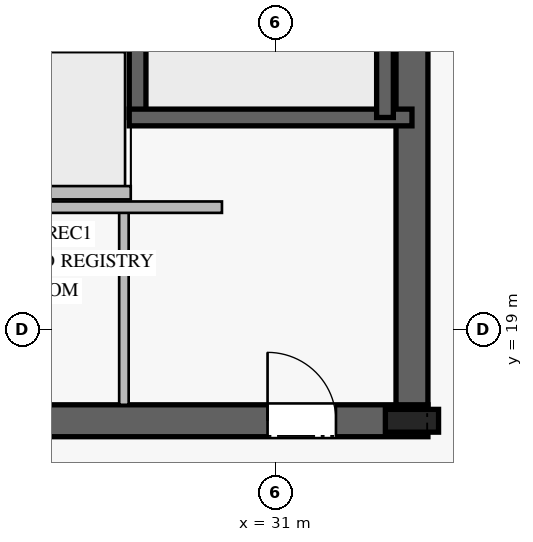
"""IFC4 building model, lengths in metres.
Left out: names, types, materials, properties, quantities, classifications, styles, units other than length and angle.
Written with IfcOpenShell. Run it as: python <this file> out.ifc"""

import sys

from ifc_helpers import new_model, si_unit, direction, frame, frame_2d, origin, origin_2d, place, context, subcontext, project, spatial, rectangle, i_section, extrude, element, fill, save


model = new_model("IFC4")
c1 = context("Model", 3, precision=1e-05, world=origin(), true_north=direction((0.0, 1.0)))
c2 = subcontext(c1, "Body", "Model", "MODEL_VIEW")
j1 = project(units=[si_unit("LENGTHUNIT", "METRE"), si_unit("PLANEANGLEUNIT", "RADIAN")], contexts=[c1])
p1 = place(None, origin())
s1 = spatial("IfcSite", under=j1, at=p1, CompositionType="ELEMENT")
p2 = place(p1, origin())
s2 = spatial("IfcBuilding", under=s1, at=p2, CompositionType="ELEMENT")
p3 = place(p2, frame((0.0, 0.0, 310.2)))
s3 = spatial("IfcBuildingStorey", under=s2, at=p3, CompositionType="ELEMENT", Elevation=310.2)
p4 = place(p3, frame((16.99, 17.8, 0.0), z_axis=(0.0, 0.0, 1.0), x_axis=(1.0, 0.0, 0.0)))
e1 = element("IfcWall", 1, at=p4, inside=s3, PredefinedType="SHEAR", context=c2, shape_type="SweptSolid", body=[
    extrude(rectangle(XDim=16.02, YDim=0.42, at=frame_2d((8.01, 0.0))), origin(), (0.0, 0.0, 1.0), 3.78),
])
p5 = place(p4, frame((4.96, 0.0, 0.0)))
e2 = element("IfcOpeningElement", 2, at=p5, cuts=e1, PredefinedType="OPENING", context=c2, shape_type="SweptSolid", body=[
    extrude(rectangle(XDim=1.2, YDim=2.25, at=frame_2d((0.6, 1.125))), frame((0.0, 0.22, 0.0), z_axis=(0.0, -1.0, 0.0), x_axis=(1.0, 0.0, 0.0)), (0.0, 0.0, 1.0), 0.44),
])
p6 = place(p4, frame((13.91, 0.0, 0.0)))
e3 = element("IfcOpeningElement", 3, at=p6, cuts=e1, PredefinedType="OPENING", context=c2, shape_type="SweptSolid", body=[
    extrude(rectangle(XDim=0.9, YDim=2.1, at=frame_2d((0.45, 1.05))), frame((0.0, 0.22, 0.0), z_axis=(0.0, -1.0, 0.0), x_axis=(1.0, 0.0, 0.0)), (0.0, 0.0, 1.0), 0.44),
])
p7 = place(p4, frame((9.16, 0.0, 0.0)))
e4 = element("IfcOpeningElement", 4, at=p7, cuts=e1, PredefinedType="OPENING", context=c2, shape_type="SweptSolid", body=[
    extrude(rectangle(XDim=1.1, YDim=2.2, at=frame_2d((0.55, 1.1))), frame((0.0, 0.22, 0.0), z_axis=(0.0, -1.0, 0.0), x_axis=(1.0, 0.0, 0.0)), (0.0, 0.0, 1.0), 0.44),
])
p8 = place(p3, frame((32.8, 18.01, 0.0), z_axis=(0.0, 0.0, 1.0), x_axis=(0.0, 1.0, 0.0)))
e5 = element("IfcWall", 5, at=p8, inside=s3, PredefinedType="SHEAR", context=c2, shape_type="SweptSolid", body=[
    extrude(rectangle(XDim=13.98, YDim=0.42, at=frame_2d((6.99, 0.0))), origin(), (0.0, 0.0, 1.0), 3.78),
])
p9 = place(p3, frame((32.8, 17.8, 0.0), z_axis=(0.0, 0.0, 1.0), x_axis=(1.0, 0.0, 0.0)))
e6 = element("IfcColumn", 6, at=p9, inside=s3, PredefinedType="COLUMN", context=c2, shape_type="SweptSolid", body=[
    extrude(i_section(OverallWidth=0.3, OverallDepth=0.7, WebThickness=0.017, FlangeThickness=0.032, at=origin_2d()), origin(), (0.0, 0.0, 1.0), 4.0),
])
p10 = place(p3, frame((29.19, 21.79, 0.0), z_axis=(0.0, 0.0, 1.0), x_axis=(0.0, 1.0, 0.0)))
e7 = element("IfcWall", 7, at=p10, inside=s3, PredefinedType="SOLIDWALL", context=c2, shape_type="SweptSolid", body=[
    extrude(rectangle(XDim=7.22, YDim=0.22, at=frame_2d((3.61, 0.0))), origin(), (0.0, 0.0, 1.0), 3.78),
])
p11 = place(p10, frame((5.88, 0.0, 0.0)))
e8 = element("IfcOpeningElement", 8, at=p11, cuts=e7, PredefinedType="OPENING", context=c2, shape_type="SweptSolid", body=[
    extrude(rectangle(XDim=1.15, YDim=2.2, at=frame_2d((0.575, 1.1))), frame((0.0, 0.12, 0.0), z_axis=(0.0, -1.0, 0.0), x_axis=(1.0, 0.0, 0.0)), (0.0, 0.0, 1.0), 0.24),
])
p12 = place(p3, frame((29.08, 21.79, 0.0), z_axis=(0.0, 0.0, 1.0), x_axis=(1.0, 0.0, 0.0)))
e9 = element("IfcWall", 9, at=p12, inside=s3, PredefinedType="SOLIDWALL", context=c2, shape_type="SweptSolid", body=[
    extrude(rectangle(XDim=3.72, YDim=0.22, at=frame_2d((1.86, 0.0))), origin(), (0.0, 0.0, 1.0), 3.78),
])
p13 = place(p3, frame((32.445, 29.01, 0.0), z_axis=(0.0, 0.0, 1.0), x_axis=(0.0, -1.0, 0.0)))
e10 = element("IfcWall", 10, at=p13, inside=s3, PredefinedType="SOLIDWALL", context=c2, shape_type="SweptSolid", body=[
    extrude(rectangle(XDim=7.22, YDim=0.22, at=frame_2d((3.61, 0.0))), origin(), (0.0, 0.0, 1.0), 3.78),
])
p14 = place(p3, frame((29.01, 18.01, 0.0), z_axis=(0.0, 0.0, 1.0), x_axis=(0.0, 1.0, 0.0)))
e11 = element("IfcWall", 11, at=p14, inside=s3, PredefinedType="PARTITIONING", context=c2, shape_type="SweptSolid", body=[
    extrude(rectangle(XDim=2.54, YDim=0.125, at=frame_2d((1.27, 0.0))), origin(), (0.0, 0.0, 1.0), 3.78),
])
p15 = place(p3, frame((24.4, 20.61, 0.0), z_axis=(0.0, 0.0, 1.0), x_axis=(1.0, 0.0, 0.0)))
e12 = element("IfcWall", 12, at=p15, inside=s3, PredefinedType="PARTITIONING", context=c2, shape_type="SweptSolid", body=[
    extrude(rectangle(XDim=5.9, YDim=0.15, at=frame_2d((2.95, 0.0))), origin(), (0.0, 0.0, 1.0), 3.78),
])
p16 = place(p3, frame((26.75, 20.8, 0.0), z_axis=(0.0, 0.0, 1.0), x_axis=(1.0, 0.0, 0.0)))
e13 = element("IfcWall", 13, at=p16, inside=s3, PredefinedType="PARTITIONING", context=c2, shape_type="SweptSolid", body=[
    extrude(rectangle(XDim=2.35, YDim=0.175, at=frame_2d((1.175, 0.0))), origin(), (0.0, 0.0, 1.0), 3.78),
])
p17 = place(p6, origin())
e14 = element("IfcDoor", 14, at=p17, inside=s3, OperationType="SINGLE_SWING_LEFT", PredefinedType="DOOR", context=c2, shape_type="SweptSolid", body=[
    extrude(rectangle(XDim=0.9, YDim=2.1, at=frame_2d((0.45, 1.05))), frame((0.0, 0.025, 0.0), z_axis=(0.0, -1.0, 0.0), x_axis=(1.0, 0.0, 0.0)), (0.0, 0.0, 1.0), 0.05),
])
fill(e3, e14)
save(model, sys.argv[1])
